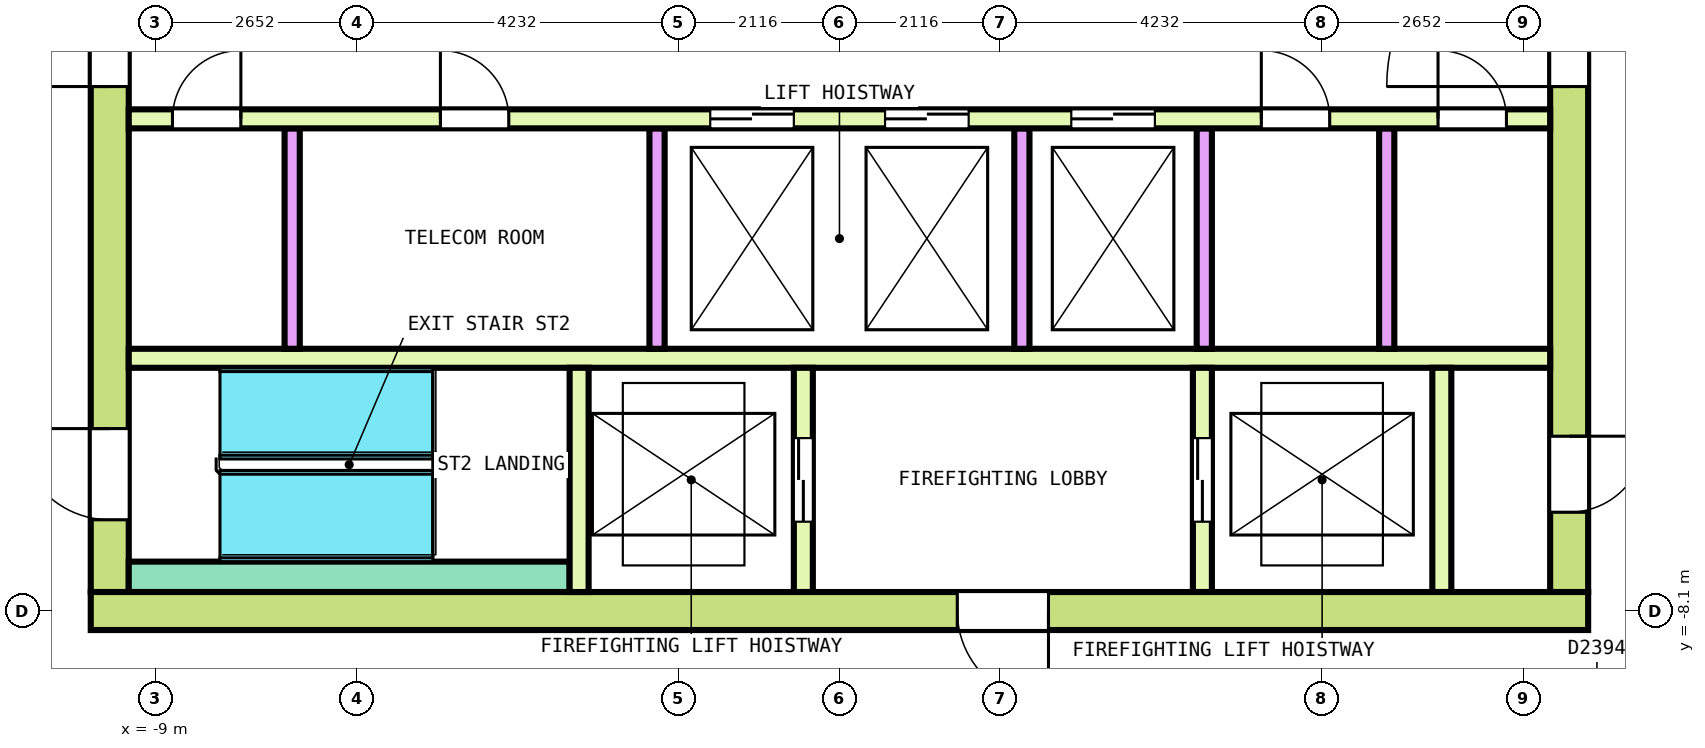
"""IFC4 building model, lengths in metres.
Left out: names, types, materials, properties, quantities, classifications, styles, units other than length and angle.
Written with IfcOpenShell. Run it as: python <this file> out.ifc"""

import sys

from ifc_helpers import new_model, si_unit, direction, frame, frame_2d, origin, place, context, subcontext, project, spatial, rectangle, extrude, element, fill, save


model = new_model("IFC4")
c1 = context("Model", 3, precision=1e-05, world=origin(), true_north=direction((0.0, 1.0)))
c2 = subcontext(c1, "Body", "Model", "MODEL_VIEW")
j1 = project(units=[si_unit("LENGTHUNIT", "METRE"), si_unit("PLANEANGLEUNIT", "RADIAN")], contexts=[c1])
p1 = place(None, origin())
s1 = spatial("IfcSite", under=j1, at=p1, CompositionType="ELEMENT")
p2 = place(p1, origin())
s2 = spatial("IfcBuilding", under=s1, at=p2, CompositionType="ELEMENT")
p3 = place(p2, frame((0.0, 0.0, 332.6)))
s3 = spatial("IfcBuildingStorey", under=s2, at=p3, CompositionType="ELEMENT", Elevation=332.6)
p4 = place(p3, frame((-9.85, -8.1, 0.0), z_axis=(0.0, 0.0, 1.0), x_axis=(1.0, 0.0, 0.0)))
e1 = element("IfcWall", 1, at=p4, inside=s3, PredefinedType="SHEAR", context=c2, shape_type="SweptSolid", body=[
    extrude(rectangle(XDim=19.7, YDim=0.5, at=frame_2d((9.85, 0.0))), origin(), (0.0, 0.0, 1.0), 3.7),
])
p5 = place(p4, frame((11.4, 0.0, 0.0)))
e2 = element("IfcOpeningElement", 2, at=p5, cuts=e1, PredefinedType="OPENING", context=c2, shape_type="SweptSolid", body=[
    extrude(rectangle(XDim=1.2, YDim=2.1, at=frame_2d((0.6, 1.05))), frame((0.0, 0.26, 0.0), z_axis=(0.0, -1.0, 0.0), x_axis=(1.0, 0.0, 0.0)), (0.0, 0.0, 1.0), 0.52),
])
p6 = place(p3, frame((-9.6, -7.85, 0.0), z_axis=(0.0, 0.0, 1.0), x_axis=(0.0, 1.0, 0.0)))
e3 = element("IfcWall", 3, at=p6, inside=s3, PredefinedType="SHEAR", context=c2, shape_type="SweptSolid", body=[
    extrude(rectangle(XDim=15.7, YDim=0.5, at=frame_2d((7.85, 0.0))), origin(), (0.0, 0.0, 1.0), 3.7),
])
p7 = place(p6, frame((6.65, 0.0, 0.0)))
e4 = element("IfcOpeningElement", 4, at=p7, cuts=e3, PredefinedType="OPENING", context=c2, shape_type="SweptSolid", body=[
    extrude(rectangle(XDim=2.4, YDim=2.1, at=frame_2d((1.2, 1.05))), frame((0.0, 0.26, 0.0), z_axis=(0.0, -1.0, 0.0), x_axis=(1.0, 0.0, 0.0)), (0.0, 0.0, 1.0), 0.52),
])
p8 = place(p6, frame((13.55, 0.0, 0.0)))
e5 = element("IfcOpeningElement", 5, at=p8, cuts=e3, PredefinedType="OPENING", context=c2, shape_type="SweptSolid", body=[
    extrude(rectangle(XDim=1.2, YDim=2.1, at=frame_2d((0.6, 1.05))), frame((0.0, 0.26, 0.0), z_axis=(0.0, -1.0, 0.0), x_axis=(1.0, 0.0, 0.0)), (0.0, 0.0, 1.0), 0.52),
])
p9 = place(p6, frame((0.95, 0.0, 0.0)))
e6 = element("IfcOpeningElement", 6, at=p9, cuts=e3, PredefinedType="OPENING", context=c2, shape_type="SweptSolid", body=[
    extrude(rectangle(XDim=1.2, YDim=2.1, at=frame_2d((0.6, 1.05))), frame((0.0, 0.26, 0.0), z_axis=(0.0, -1.0, 0.0), x_axis=(1.0, 0.0, 0.0)), (0.0, 0.0, 1.0), 0.52),
])
p10 = place(p3, frame((9.6, -7.85, 0.0), z_axis=(0.0, 0.0, 1.0), x_axis=(0.0, 1.0, 0.0)))
e7 = element("IfcWall", 7, at=p10, inside=s3, PredefinedType="SHEAR", context=c2, shape_type="SweptSolid", body=[
    extrude(rectangle(XDim=15.7, YDim=0.5, at=frame_2d((7.85, 0.0))), origin(), (0.0, 0.0, 1.0), 3.7),
])
p11 = place(p10, frame((6.65, 0.0, 0.0)))
e8 = element("IfcOpeningElement", 8, at=p11, cuts=e7, PredefinedType="OPENING", context=c2, shape_type="SweptSolid", body=[
    extrude(rectangle(XDim=2.4, YDim=2.1, at=frame_2d((1.2, 1.05))), frame((0.0, 0.26, 0.0), z_axis=(0.0, -1.0, 0.0), x_axis=(1.0, 0.0, 0.0)), (0.0, 0.0, 1.0), 0.52),
])
p12 = place(p10, frame((13.55, 0.0, 0.0)))
e9 = element("IfcOpeningElement", 9, at=p12, cuts=e7, PredefinedType="OPENING", context=c2, shape_type="SweptSolid", body=[
    extrude(rectangle(XDim=1.2, YDim=2.1, at=frame_2d((0.6, 1.05))), frame((0.0, 0.26, 0.0), z_axis=(0.0, -1.0, 0.0), x_axis=(1.0, 0.0, 0.0)), (0.0, 0.0, 1.0), 0.52),
])
p13 = place(p10, frame((1.05, 0.0, 0.0)))
e10 = element("IfcOpeningElement", 10, at=p13, cuts=e7, PredefinedType="OPENING", context=c2, shape_type="SweptSolid", body=[
    extrude(rectangle(XDim=1.0, YDim=2.1, at=frame_2d((0.5, 1.05))), frame((0.0, 0.26, 0.0), z_axis=(0.0, -1.0, 0.0), x_axis=(1.0, 0.0, 0.0)), (0.0, 0.0, 1.0), 0.52),
])
p14 = place(p3, frame((-9.35, -1.625, 0.0), z_axis=(0.0, 0.0, 1.0), x_axis=(1.0, 0.0, 0.0)))
e11 = element("IfcWall", 11, at=p14, inside=s3, PredefinedType="SOLIDWALL", context=c2, shape_type="SweptSolid", body=[
    extrude(rectangle(XDim=18.7, YDim=0.25, at=frame_2d((9.35, 0.0))), origin(), (0.0, 0.0, 1.0), 3.7),
])
p15 = place(p14, frame((7.65, 0.0, 0.0)))
e12 = element("IfcOpeningElement", 12, at=p15, cuts=e11, PredefinedType="OPENING", context=c2, shape_type="SweptSolid", body=[
    extrude(rectangle(XDim=1.1, YDim=2.1, at=frame_2d((0.55, 1.05))), frame((0.0, 0.135, 0.0), z_axis=(0.0, -1.0, 0.0), x_axis=(1.0, 0.0, 0.0)), (0.0, 0.0, 1.0), 0.27),
])
p16 = place(p14, frame((9.95, 0.0, 0.0)))
e13 = element("IfcOpeningElement", 13, at=p16, cuts=e11, PredefinedType="OPENING", context=c2, shape_type="SweptSolid", body=[
    extrude(rectangle(XDim=1.1, YDim=2.1, at=frame_2d((0.55, 1.05))), frame((0.0, 0.135, 0.0), z_axis=(0.0, -1.0, 0.0), x_axis=(1.0, 0.0, 0.0)), (0.0, 0.0, 1.0), 0.27),
])
p17 = place(p14, frame((12.4, 0.0, 0.0)))
e14 = element("IfcOpeningElement", 14, at=p17, cuts=e11, PredefinedType="OPENING", context=c2, shape_type="SweptSolid", body=[
    extrude(rectangle(XDim=1.1, YDim=2.1, at=frame_2d((0.55, 1.05))), frame((0.0, 0.135, 0.0), z_axis=(0.0, -1.0, 0.0), x_axis=(1.0, 0.0, 0.0)), (0.0, 0.0, 1.0), 0.27),
])
p18 = place(p14, frame((0.575, 0.0, 0.0)))
e15 = element("IfcOpeningElement", 15, at=p18, cuts=e11, PredefinedType="OPENING", context=c2, shape_type="SweptSolid", body=[
    extrude(rectangle(XDim=0.9, YDim=2.1, at=frame_2d((0.45, 1.05))), frame((0.0, 0.135, 0.0), z_axis=(0.0, -1.0, 0.0), x_axis=(1.0, 0.0, 0.0)), (0.0, 0.0, 1.0), 0.27),
])
p19 = place(p14, frame((4.1, 0.0, 0.0)))
e16 = element("IfcOpeningElement", 16, at=p19, cuts=e11, PredefinedType="OPENING", context=c2, shape_type="SweptSolid", body=[
    extrude(rectangle(XDim=0.9, YDim=2.1, at=frame_2d((0.45, 1.05))), frame((0.0, 0.135, 0.0), z_axis=(0.0, -1.0, 0.0), x_axis=(1.0, 0.0, 0.0)), (0.0, 0.0, 1.0), 0.27),
])
p20 = place(p14, frame((14.9, 0.0, 0.0)))
e17 = element("IfcOpeningElement", 17, at=p20, cuts=e11, PredefinedType="OPENING", context=c2, shape_type="SweptSolid", body=[
    extrude(rectangle(XDim=0.9, YDim=2.1, at=frame_2d((0.45, 1.05))), frame((0.0, 0.135, 0.0), z_axis=(0.0, -1.0, 0.0), x_axis=(1.0, 0.0, 0.0)), (0.0, 0.0, 1.0), 0.27),
])
p21 = place(p14, frame((17.225, 0.0, 0.0)))
e18 = element("IfcOpeningElement", 18, at=p21, cuts=e11, PredefinedType="OPENING", context=c2, shape_type="SweptSolid", body=[
    extrude(rectangle(XDim=0.9, YDim=2.1, at=frame_2d((0.45, 1.05))), frame((0.0, 0.135, 0.0), z_axis=(0.0, -1.0, 0.0), x_axis=(1.0, 0.0, 0.0)), (0.0, 0.0, 1.0), 0.27),
])
p22 = place(p3, frame((-9.35, -4.775, 0.0), z_axis=(0.0, 0.0, 1.0), x_axis=(1.0, 0.0, 0.0)))
e19 = element("IfcWall", 19, at=p22, inside=s3, PredefinedType="SOLIDWALL", context=c2, shape_type="SweptSolid", body=[
    extrude(rectangle(XDim=18.7, YDim=0.25, at=frame_2d((9.35, 0.0))), origin(), (0.0, 0.0, 1.0), 3.7),
])
for number, where, z_axis, x_axis in (
    (20, (-7.2, -4.65, 0.0), (0.0, 0.0, 1.0), (0.0, 1.0, 0.0)),
    (21, (-2.4, -4.65, 0.0), (0.0, 0.0, 1.0), (0.0, 1.0, 0.0)),
    (22, (2.4, -4.65, 0.0), (0.0, 0.0, 1.0), (0.0, 1.0, 0.0)),
    (23, (4.8, -4.65, 0.0), (0.0, 0.0, 1.0), (0.0, 1.0, 0.0)),
    (24, (7.2, -4.65, 0.0), (0.0, 0.0, 1.0), (0.0, 1.0, 0.0)),
):
    element("IfcWall", number, at=place(p3, frame(where, z_axis=z_axis, x_axis=x_axis)), inside=s3, PredefinedType="SOLIDWALL", context=c2, shape_type="SweptSolid", body=[
        extrude(rectangle(XDim=2.9, YDim=0.2, at=frame_2d((1.45, 0.0))), origin(), (0.0, 0.0, 1.0), 3.7),
    ])
p23 = place(p3, frame((-9.35, -7.65, 0.0), z_axis=(0.0, 0.0, 1.0), x_axis=(1.0, 0.0, 0.0)))
e25 = element("IfcWall", 25, at=p23, inside=s3, PredefinedType="SOLIDWALL", context=c2, shape_type="SweptSolid", body=[
    extrude(rectangle(XDim=5.8, YDim=0.4, at=frame_2d((2.9, 0.0))), origin(), (0.0, 0.0, 1.0), 3.7),
])
p24 = place(p3, frame((-3.425, -7.85, 0.0), z_axis=(0.0, 0.0, 1.0), x_axis=(0.0, 1.0, 0.0)))
e26 = element("IfcWall", 26, at=p24, inside=s3, PredefinedType="SOLIDWALL", context=c2, shape_type="SweptSolid", body=[
    extrude(rectangle(XDim=2.95, YDim=0.25, at=frame_2d((1.475, 0.0))), origin(), (0.0, 0.0, 1.0), 3.7),
])
p25 = place(p3, frame((-0.475, -7.85, 0.0), z_axis=(0.0, 0.0, 1.0), x_axis=(0.0, 1.0, 0.0)))
e27 = element("IfcWall", 27, at=p25, inside=s3, PredefinedType="SOLIDWALL", context=c2, shape_type="SweptSolid", body=[
    extrude(rectangle(XDim=2.95, YDim=0.25, at=frame_2d((1.475, 0.0))), origin(), (0.0, 0.0, 1.0), 3.7),
])
p26 = place(p25, frame((0.925, 0.0, 0.0)))
e28 = element("IfcOpeningElement", 28, at=p26, cuts=e27, PredefinedType="OPENING", context=c2, shape_type="SweptSolid", body=[
    extrude(rectangle(XDim=1.1, YDim=2.1, at=frame_2d((0.55, 1.05))), frame((0.0, 0.135, 0.0), z_axis=(0.0, -1.0, 0.0), x_axis=(1.0, 0.0, 0.0)), (0.0, 0.0, 1.0), 0.27),
])
p27 = place(p3, frame((4.775, -7.85, 0.0), z_axis=(0.0, 0.0, 1.0), x_axis=(0.0, 1.0, 0.0)))
e29 = element("IfcWall", 29, at=p27, inside=s3, PredefinedType="SOLIDWALL", context=c2, shape_type="SweptSolid", body=[
    extrude(rectangle(XDim=2.95, YDim=0.25, at=frame_2d((1.475, 0.0))), origin(), (0.0, 0.0, 1.0), 3.7),
])
p28 = place(p27, frame((0.925, 0.0, 0.0)))
e30 = element("IfcOpeningElement", 30, at=p28, cuts=e29, PredefinedType="OPENING", context=c2, shape_type="SweptSolid", body=[
    extrude(rectangle(XDim=1.1, YDim=2.1, at=frame_2d((0.55, 1.05))), frame((0.0, 0.135, 0.0), z_axis=(0.0, -1.0, 0.0), x_axis=(1.0, 0.0, 0.0)), (0.0, 0.0, 1.0), 0.27),
])
p29 = place(p3, frame((7.925, -7.85, 0.0), z_axis=(0.0, 0.0, 1.0), x_axis=(0.0, 1.0, 0.0)))
e31 = element("IfcWall", 31, at=p29, inside=s3, PredefinedType="SOLIDWALL", context=c2, shape_type="SweptSolid", body=[
    extrude(rectangle(XDim=2.95, YDim=0.25, at=frame_2d((1.475, 0.0))), origin(), (0.0, 0.0, 1.0), 3.7),
])
p30 = place(p15, origin())
e32 = element("IfcDoor", 32, at=p30, inside=s3, OperationType="DOUBLE_DOOR_SLIDING", PredefinedType="DOOR", context=c2, shape_type="SweptSolid", body=[
    extrude(rectangle(XDim=1.1, YDim=2.1, at=frame_2d((0.55, 1.05))), frame((0.0, 0.075, 0.0), z_axis=(0.0, -1.0, 0.0), x_axis=(1.0, 0.0, 0.0)), (0.0, 0.0, 1.0), 0.15),
])
fill(e12, e32)
p31 = place(p16, origin())
e33 = element("IfcDoor", 33, at=p31, inside=s3, OperationType="DOUBLE_DOOR_SLIDING", PredefinedType="DOOR", context=c2, shape_type="SweptSolid", body=[
    extrude(rectangle(XDim=1.1, YDim=2.1, at=frame_2d((0.55, 1.05))), frame((0.0, 0.075, 0.0), z_axis=(0.0, -1.0, 0.0), x_axis=(1.0, 0.0, 0.0)), (0.0, 0.0, 1.0), 0.15),
])
fill(e13, e33)
p32 = place(p17, origin())
e34 = element("IfcDoor", 34, at=p32, inside=s3, OperationType="DOUBLE_DOOR_SLIDING", PredefinedType="DOOR", context=c2, shape_type="SweptSolid", body=[
    extrude(rectangle(XDim=1.1, YDim=2.1, at=frame_2d((0.55, 1.05))), frame((0.0, 0.075, 0.0), z_axis=(0.0, -1.0, 0.0), x_axis=(1.0, 0.0, 0.0)), (0.0, 0.0, 1.0), 0.15),
])
fill(e14, e34)
p33 = place(p26, origin())
e35 = element("IfcDoor", 35, at=p33, inside=s3, OperationType="DOUBLE_DOOR_SLIDING", PredefinedType="DOOR", context=c2, shape_type="SweptSolid", body=[
    extrude(rectangle(XDim=1.1, YDim=2.1, at=frame_2d((0.55, 1.05))), frame((0.0, 0.075, 0.0), z_axis=(0.0, -1.0, 0.0), x_axis=(1.0, 0.0, 0.0)), (0.0, 0.0, 1.0), 0.15),
])
fill(e28, e35)
p34 = place(p28, origin())
e36 = element("IfcDoor", 36, at=p34, inside=s3, OperationType="DOUBLE_DOOR_SLIDING", PredefinedType="DOOR", context=c2, shape_type="SweptSolid", body=[
    extrude(rectangle(XDim=1.1, YDim=2.1, at=frame_2d((0.55, 1.05))), frame((0.0, 0.075, 0.0), z_axis=(0.0, -1.0, 0.0), x_axis=(1.0, 0.0, 0.0)), (0.0, 0.0, 1.0), 0.15),
])
fill(e30, e36)
p35 = place(p7, origin())
e37 = element("IfcDoor", 37, at=p35, inside=s3, OperationType="DOUBLE_DOOR_SINGLE_SWING", PredefinedType="DOOR", context=c2, shape_type="SweptSolid", body=[
    extrude(rectangle(XDim=2.4, YDim=2.1, at=frame_2d((1.2, 1.05))), frame((0.0, 0.2, 0.0), z_axis=(0.0, -1.0, 0.0), x_axis=(1.0, 0.0, 0.0)), (0.0, 0.0, 1.0), 0.4),
])
fill(e4, e37)
p36 = place(p11, origin())
e38 = element("IfcDoor", 38, at=p36, inside=s3, OperationType="DOUBLE_DOOR_SINGLE_SWING", PredefinedType="DOOR", context=c2, shape_type="SweptSolid", body=[
    extrude(rectangle(XDim=2.4, YDim=2.1, at=frame_2d((1.2, 1.05))), frame((0.0, 0.2, 0.0), z_axis=(0.0, -1.0, 0.0), x_axis=(1.0, 0.0, 0.0)), (0.0, 0.0, 1.0), 0.4),
])
fill(e8, e38)
p37 = place(p9, origin())
e39 = element("IfcDoor", 39, at=p37, inside=s3, OperationType="SINGLE_SWING_LEFT", PredefinedType="DOOR", context=c2, shape_type="SweptSolid", body=[
    extrude(rectangle(XDim=1.2, YDim=2.1, at=frame_2d((0.6, 1.05))), frame((0.0, 0.2, 0.0), z_axis=(0.0, -1.0, 0.0), x_axis=(1.0, 0.0, 0.0)), (0.0, 0.0, 1.0), 0.4),
])
fill(e6, e39)
p38 = place(p5, origin())
e40 = element("IfcDoor", 40, at=p38, inside=s3, OperationType="SINGLE_SWING_LEFT", PredefinedType="DOOR", context=c2, shape_type="SweptSolid", body=[
    extrude(rectangle(XDim=1.2, YDim=2.1, at=frame_2d((0.6, 1.05))), frame((0.0, 0.2, 0.0), z_axis=(0.0, -1.0, 0.0), x_axis=(1.0, 0.0, 0.0)), (0.0, 0.0, 1.0), 0.4),
])
fill(e2, e40)
p39 = place(p13, origin())
e41 = element("IfcDoor", 41, at=p39, inside=s3, OperationType="SINGLE_SWING_LEFT", PredefinedType="DOOR", context=c2, shape_type="SweptSolid", body=[
    extrude(rectangle(XDim=1.0, YDim=2.1, at=frame_2d((0.5, 1.05))), frame((0.0, 0.2, 0.0), z_axis=(0.0, -1.0, 0.0), x_axis=(1.0, 0.0, 0.0)), (0.0, 0.0, 1.0), 0.4),
])
fill(e10, e41)
p40 = place(p18, origin())
e42 = element("IfcDoor", 42, at=p40, inside=s3, OperationType="SINGLE_SWING_RIGHT", PredefinedType="DOOR", context=c2, shape_type="SweptSolid", body=[
    extrude(rectangle(XDim=0.9, YDim=2.1, at=frame_2d((0.45, 1.05))), frame((0.0, 0.075, 0.0), z_axis=(0.0, -1.0, 0.0), x_axis=(1.0, 0.0, 0.0)), (0.0, 0.0, 1.0), 0.15),
])
fill(e15, e42)
p41 = place(p19, origin())
e43 = element("IfcDoor", 43, at=p41, inside=s3, OperationType="SINGLE_SWING_LEFT", PredefinedType="DOOR", context=c2, shape_type="SweptSolid", body=[
    extrude(rectangle(XDim=0.9, YDim=2.1, at=frame_2d((0.45, 1.05))), frame((0.0, 0.075, 0.0), z_axis=(0.0, -1.0, 0.0), x_axis=(1.0, 0.0, 0.0)), (0.0, 0.0, 1.0), 0.15),
])
fill(e16, e43)
p42 = place(p20, origin())
e44 = element("IfcDoor", 44, at=p42, inside=s3, OperationType="SINGLE_SWING_RIGHT", PredefinedType="DOOR", context=c2, shape_type="SweptSolid", body=[
    extrude(rectangle(XDim=0.9, YDim=2.1, at=frame_2d((0.45, 1.05))), frame((0.0, 0.075, 0.0), z_axis=(0.0, -1.0, 0.0), x_axis=(1.0, 0.0, 0.0)), (0.0, 0.0, 1.0), 0.15),
])
fill(e17, e44)
p43 = place(p21, origin())
e45 = element("IfcDoor", 45, at=p43, inside=s3, OperationType="SINGLE_SWING_LEFT", PredefinedType="DOOR", context=c2, shape_type="SweptSolid", body=[
    extrude(rectangle(XDim=0.9, YDim=2.1, at=frame_2d((0.45, 1.05))), frame((0.0, 0.075, 0.0), z_axis=(0.0, -1.0, 0.0), x_axis=(1.0, 0.0, 0.0)), (0.0, 0.0, 1.0), 0.15),
])
fill(e18, e45)
save(model, sys.argv[1])
